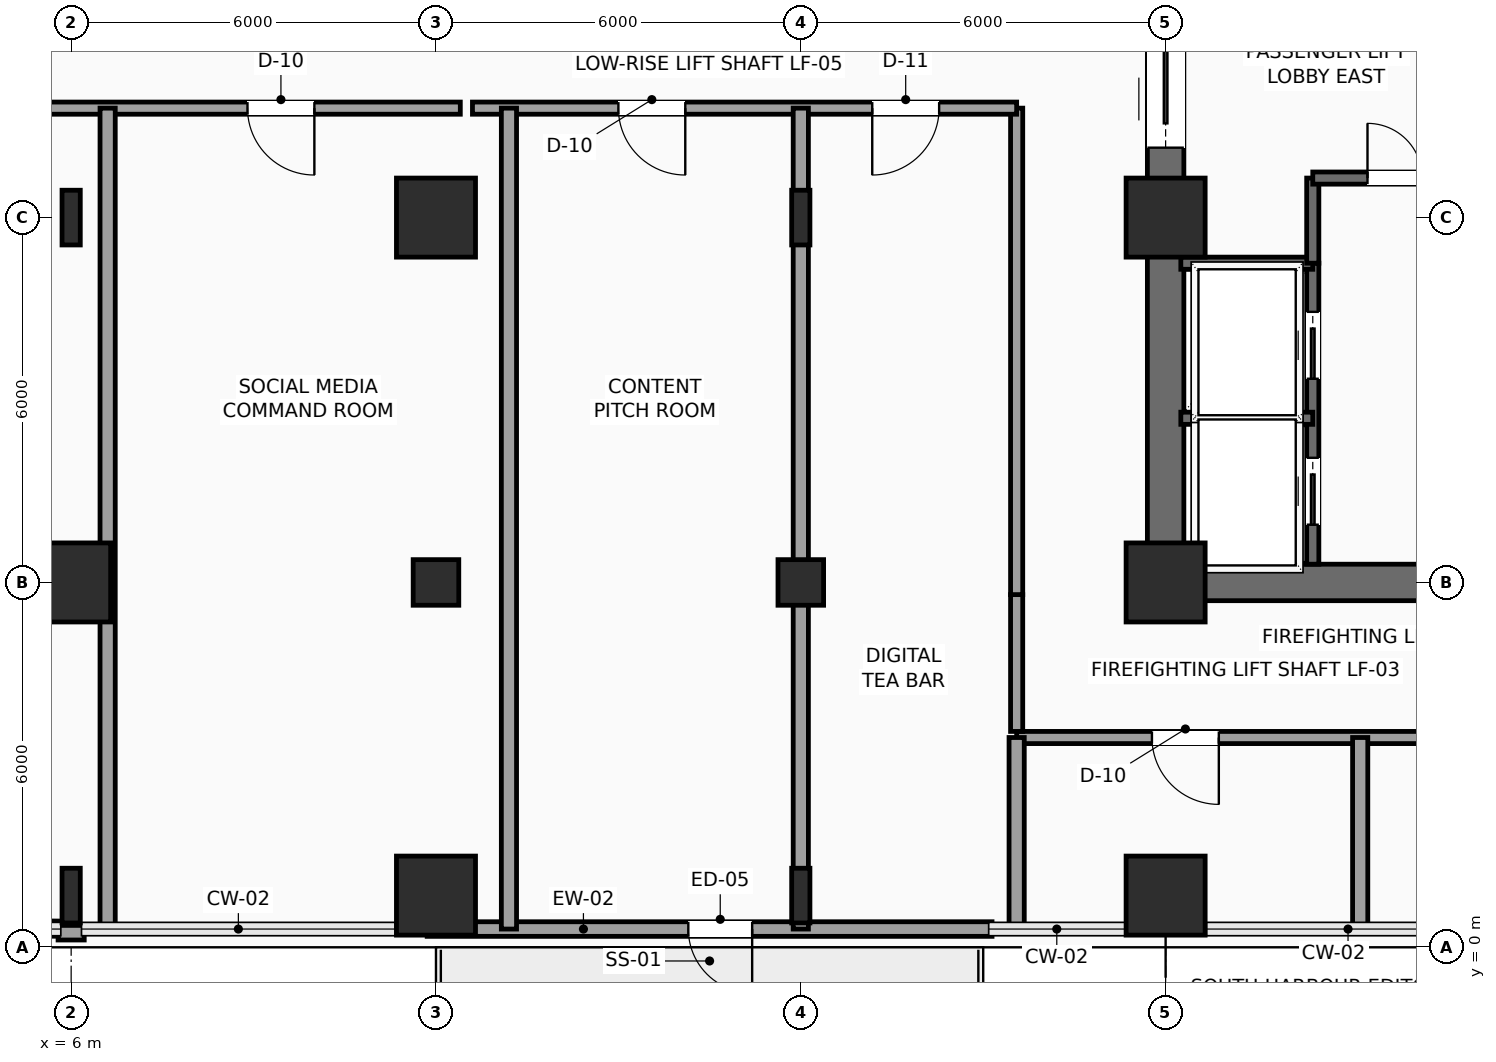
"""IFC4 building model, lengths in metres.
Left out: names, types, materials, properties, quantities, classifications, styles, units other than length and angle.
Written with IfcOpenShell. Run it as: python <this file> out.ifc"""

import sys

from ifc_helpers import new_model, si_unit, direction, frame, frame_2d, origin, origin_2d, place, context, subcontext, project, spatial, rectangle, hollow_rectangle, i_section, extrude, element, fill, save


model = new_model("IFC4")
c1 = context("Model", 3, precision=1e-05, world=origin(), true_north=direction((0.0, 1.0)))
c2 = subcontext(c1, "Body", "Model", "MODEL_VIEW")
j1 = project(units=[si_unit("LENGTHUNIT", "METRE"), si_unit("PLANEANGLEUNIT", "RADIAN")], contexts=[c1])
p1 = place(None, origin())
s1 = spatial("IfcSite", under=j1, at=p1, CompositionType="ELEMENT")
p2 = place(p1, origin())
s2 = spatial("IfcBuilding", under=s1, at=p2, CompositionType="ELEMENT")
p3 = place(p2, frame((0.0, 0.0, 83.1)))
s3 = spatial("IfcBuildingStorey", under=s2, at=p3, CompositionType="ELEMENT", Elevation=83.1)
for number, where, z_axis, x_axis in (
    (1, (24.0, 6.0, 0.0), (0.0, 0.0, 1.0), (1.0, 0.0, 0.0)),
    (2, (24.0, 12.0, 0.0), (0.0, 0.0, 1.0), (1.0, 0.0, 0.0)),
):
    element("IfcColumn", number, at=place(p3, frame(where, z_axis=z_axis, x_axis=x_axis)), inside=s3, PredefinedType="COLUMN", context=c2, shape_type="SweptSolid", body=[
        extrude(rectangle(XDim=1.3, YDim=1.3, at=origin_2d()), origin(), (0.0, 0.0, 1.0), 3.9),
    ])
p4 = place(p3, frame((6.0, 0.85, 0.0), z_axis=(0.0, 0.0, 1.0), x_axis=(1.0, 0.0, 0.0)))
e3 = element("IfcColumn", 3, at=p4, inside=s3, PredefinedType="COLUMN", context=c2, shape_type="SweptSolid", body=[
    extrude(i_section(OverallWidth=0.3, OverallDepth=0.9, WebThickness=0.019, FlangeThickness=0.035, FilletRadius=0.03, at=origin_2d()), origin(), (0.0, 0.0, 1.0), 3.9),
])
p5 = place(p3, frame((6.0, 6.0, 0.0), z_axis=(0.0, 0.0, 1.0), x_axis=(1.0, 0.0, 0.0)))
e4 = element("IfcColumn", 4, at=p5, inside=s3, PredefinedType="COLUMN", context=c2, shape_type="SweptSolid", body=[
    extrude(rectangle(XDim=1.3, YDim=1.3, at=origin_2d()), origin(), (0.0, 0.0, 1.0), 3.9),
])
p6 = place(p3, frame((6.0, 12.0, 0.0), z_axis=(0.0, 0.0, 1.0), x_axis=(1.0, 0.0, 0.0)))
e5 = element("IfcColumn", 5, at=p6, inside=s3, PredefinedType="COLUMN", context=c2, shape_type="SweptSolid", body=[
    extrude(i_section(OverallWidth=0.3, OverallDepth=0.9, WebThickness=0.019, FlangeThickness=0.035, FilletRadius=0.03, at=origin_2d()), origin(), (0.0, 0.0, 1.0), 3.9),
])
p7 = place(p3, frame((12.0, 0.85, 0.0), z_axis=(0.0, 0.0, 1.0), x_axis=(1.0, 0.0, 0.0)))
e6 = element("IfcColumn", 6, at=p7, inside=s3, PredefinedType="COLUMN", context=c2, shape_type="SweptSolid", body=[
    extrude(rectangle(XDim=1.3, YDim=1.3, at=origin_2d()), origin(), (0.0, 0.0, 1.0), 3.9),
])
p8 = place(p3, frame((12.0, 6.0, 0.0), z_axis=(0.0, 0.0, 1.0), x_axis=(1.0, 0.0, 0.0)))
e7 = element("IfcColumn", 7, at=p8, inside=s3, PredefinedType="COLUMN", context=c2, shape_type="SweptSolid", body=[
    extrude(hollow_rectangle(XDim=0.75, YDim=0.75, WallThickness=0.035, InnerFilletRadius=0.035, OuterFilletRadius=0.05, at=origin_2d()), origin(), (0.0, 0.0, 1.0), 3.9),
])
p9 = place(p3, frame((12.0, 12.0, 0.0), z_axis=(0.0, 0.0, 1.0), x_axis=(1.0, 0.0, 0.0)))
e8 = element("IfcColumn", 8, at=p9, inside=s3, PredefinedType="COLUMN", context=c2, shape_type="SweptSolid", body=[
    extrude(rectangle(XDim=1.3, YDim=1.3, at=origin_2d()), origin(), (0.0, 0.0, 1.0), 3.9),
])
p10 = place(p3, frame((18.0, 0.85, 0.0), z_axis=(0.0, 0.0, 1.0), x_axis=(1.0, 0.0, 0.0)))
e9 = element("IfcColumn", 9, at=p10, inside=s3, PredefinedType="COLUMN", context=c2, shape_type="SweptSolid", body=[
    extrude(i_section(OverallWidth=0.3, OverallDepth=0.9, WebThickness=0.019, FlangeThickness=0.035, FilletRadius=0.03, at=origin_2d()), origin(), (0.0, 0.0, 1.0), 3.9),
])
p11 = place(p3, frame((18.0, 6.0, 0.0), z_axis=(0.0, 0.0, 1.0), x_axis=(1.0, 0.0, 0.0)))
e10 = element("IfcColumn", 10, at=p11, inside=s3, PredefinedType="COLUMN", context=c2, shape_type="SweptSolid", body=[
    extrude(hollow_rectangle(XDim=0.75, YDim=0.75, WallThickness=0.035, InnerFilletRadius=0.035, OuterFilletRadius=0.05, at=origin_2d()), origin(), (0.0, 0.0, 1.0), 3.9),
])
p12 = place(p3, frame((18.0, 12.0, 0.0), z_axis=(0.0, 0.0, 1.0), x_axis=(1.0, 0.0, 0.0)))
e11 = element("IfcColumn", 11, at=p12, inside=s3, PredefinedType="COLUMN", context=c2, shape_type="SweptSolid", body=[
    extrude(i_section(OverallWidth=0.3, OverallDepth=0.9, WebThickness=0.019, FlangeThickness=0.035, FilletRadius=0.03, at=origin_2d()), origin(), (0.0, 0.0, 1.0), 3.9),
])
p13 = place(p3, frame((24.0, 0.85, 0.0), z_axis=(0.0, 0.0, 1.0), x_axis=(1.0, 0.0, 0.0)))
e12 = element("IfcColumn", 12, at=p13, inside=s3, PredefinedType="COLUMN", context=c2, shape_type="SweptSolid", body=[
    extrude(rectangle(XDim=1.3, YDim=1.3, at=origin_2d()), origin(), (0.0, 0.0, 1.0), 3.9),
])
p14 = place(p3, frame((21.145, 0.3, 0.0), z_axis=(0.0, 0.0, 1.0), x_axis=(-1.0, 0.0, 0.0)))
e13 = element("IfcWall", 13, at=p14, inside=s3, PredefinedType="SOLIDWALL", context=c2, shape_type="SweptSolid", body=[
    extrude(rectangle(XDim=9.29, YDim=0.24, at=frame_2d((4.645, 0.0))), origin(), (0.0, 0.0, 1.0), 3.65),
])
p15 = place(p14, frame((3.945, 0.0, 0.0)))
e14 = element("IfcOpeningElement", 14, at=p15, cuts=e13, PredefinedType="OPENING", context=c2, shape_type="SweptSolid", body=[
    extrude(rectangle(XDim=1.05, YDim=2.2, at=frame_2d((0.525, 1.1))), frame((0.0, 0.13, 0.0), z_axis=(0.0, -1.0, 0.0), x_axis=(1.0, 0.0, 0.0)), (0.0, 0.0, 1.0), 0.26),
])
p16 = place(p3, frame((6.215, 0.24, 0.0), z_axis=(0.0, 0.0, 1.0), x_axis=(-1.0, 0.0, 0.0)))
e15 = element("IfcWall", 15, at=p16, inside=s3, PredefinedType="SOLIDWALL", context=c2, shape_type="SweptSolid", body=[
    extrude(rectangle(XDim=0.43, YDim=0.24, at=frame_2d((0.215, 0.0))), origin(), (0.0, 0.0, 1.0), 3.65),
])
p17 = place(p3, frame((24.0, 6.0, 0.0), z_axis=(0.0, 0.0, 1.0), x_axis=(1.0, 0.0, 0.0)))
e16 = element("IfcWall", 16, at=p17, inside=s3, PredefinedType="SHEAR", context=c2, shape_type="SweptSolid", body=[
    extrude(rectangle(XDim=9.6, YDim=0.6, at=frame_2d((4.8, 0.0))), origin(), (0.0, 0.0, 1.0), 3.65),
])
p18 = place(p3, frame((24.0, 6.0, 0.0), z_axis=(0.0, 0.0, 1.0), x_axis=(0.0, 1.0, 0.0)))
e17 = element("IfcWall", 17, at=p18, inside=s3, PredefinedType="SHEAR", context=c2, shape_type="SweptSolid", body=[
    extrude(rectangle(XDim=12.0, YDim=0.6, at=frame_2d((6.0, 0.0))), origin(), (0.0, 0.0, 1.0), 3.65),
])
p19 = place(p18, frame((7.15, 0.0, 0.0)))
e18 = element("IfcOpeningElement", 18, at=p19, cuts=e17, PredefinedType="OPENING", context=c2, shape_type="SweptSolid", body=[
    extrude(rectangle(XDim=1.6, YDim=2.3, at=frame_2d((0.8, 1.15))), frame((0.0, 0.31, 0.0), z_axis=(0.0, -1.0, 0.0), x_axis=(1.0, 0.0, 0.0)), (0.0, 0.0, 1.0), 0.62),
])
p20 = place(p3, frame((26.42, 6.3, 0.0), z_axis=(0.0, 0.0, 1.0), x_axis=(0.0, 1.0, 0.0)))
e19 = element("IfcWall", 19, at=p20, inside=s3, PredefinedType="SHEAR", context=c2, shape_type="SweptSolid", body=[
    extrude(rectangle(XDim=4.95, YDim=0.2, at=frame_2d((2.475, 0.0))), origin(), (0.0, 0.0, 1.0), 3.65),
])
p21 = place(p20, frame((0.65, 0.0, 0.0)))
e20 = element("IfcOpeningElement", 20, at=p21, cuts=e19, PredefinedType="OPENING", context=c2, shape_type="SweptSolid", body=[
    extrude(rectangle(XDim=1.1, YDim=2.2, at=frame_2d((0.55, 1.1))), frame((0.0, 0.11, 0.0), z_axis=(0.0, -1.0, 0.0), x_axis=(1.0, 0.0, 0.0)), (0.0, 0.0, 1.0), 0.22),
])
p22 = place(p20, frame((3.05, 0.0, 0.0)))
e21 = element("IfcOpeningElement", 21, at=p22, cuts=e19, PredefinedType="OPENING", context=c2, shape_type="SweptSolid", body=[
    extrude(rectangle(XDim=1.1, YDim=2.2, at=frame_2d((0.55, 1.1))), frame((0.0, 0.11, 0.0), z_axis=(0.0, -1.0, 0.0), x_axis=(1.0, 0.0, 0.0)), (0.0, 0.0, 1.0), 0.22),
])
for number, where, z_axis, x_axis in (
    (22, (24.25, 8.7, 0.0), (0.0, 0.0, 1.0), (1.0, 0.0, 0.0)),
    (23, (24.25, 11.25, 0.0), (0.0, 0.0, 1.0), (1.0, 0.0, 0.0)),
):
    element("IfcWall", number, at=place(p3, frame(where, z_axis=z_axis, x_axis=x_axis)), inside=s3, PredefinedType="SHEAR", context=c2, shape_type="SweptSolid", body=[
        extrude(rectangle(XDim=2.17, YDim=0.2, at=frame_2d((1.085, 0.0))), origin(), (0.0, 0.0, 1.0), 3.65),
    ])
p23 = place(p3, frame((26.42, 11.25, 0.0), z_axis=(0.0, 0.0, 1.0), x_axis=(0.0, 1.0, 0.0)))
e24 = element("IfcWall", 24, at=p23, inside=s3, PredefinedType="SHEAR", context=c2, shape_type="SweptSolid", body=[
    extrude(rectangle(XDim=1.4, YDim=0.2, at=frame_2d((0.7, 0.0))), origin(), (0.0, 0.0, 1.0), 3.65),
])
p24 = place(p3, frame((26.42, 12.65, 0.0), z_axis=(0.0, 0.0, 1.0), x_axis=(1.0, 0.0, 0.0)))
e25 = element("IfcWall", 25, at=p24, inside=s3, PredefinedType="SHEAR", context=c2, shape_type="SweptSolid", body=[
    extrude(rectangle(XDim=2.84, YDim=0.2, at=frame_2d((1.42, 0.0))), origin(), (0.0, 0.0, 1.0), 3.65),
])
p25 = place(p24, frame((0.9, 0.0, 0.0)))
e26 = element("IfcOpeningElement", 26, at=p25, cuts=e25, PredefinedType="OPENING", context=c2, shape_type="SweptSolid", body=[
    extrude(rectangle(XDim=0.9, YDim=2.15, at=frame_2d((0.45, 1.075))), frame((0.0, 0.11, 0.0), z_axis=(0.0, -1.0, 0.0), x_axis=(1.0, 0.0, 0.0)), (0.0, 0.0, 1.0), 0.22),
])
p26 = place(p3, frame((36.15, 3.45, 0.0), z_axis=(0.0, 0.0, 1.0), x_axis=(-1.0, 0.0, 0.0)))
e27 = element("IfcWall", 27, at=p26, inside=s3, PredefinedType="PARTITIONING", context=c2, shape_type="SweptSolid", body=[
    extrude(rectangle(XDim=14.6, YDim=0.2, at=frame_2d((7.3, 0.0))), origin(), (0.0, 0.0, 1.0), 3.142),
])
p27 = place(p26, frame((11.275, 0.0, 0.0)))
e28 = element("IfcOpeningElement", 28, at=p27, cuts=e27, PredefinedType="OPENING", context=c2, shape_type="SweptSolid", body=[
    extrude(rectangle(XDim=1.1, YDim=2.25, at=frame_2d((0.55, 1.125))), frame((0.0, 0.11, 0.0), z_axis=(0.0, -1.0, 0.0), x_axis=(1.0, 0.0, 0.0)), (0.0, 0.0, 1.0), 0.22),
])
p28 = place(p26, frame((5.65, 0.0, 0.0)))
e29 = element("IfcOpeningElement", 29, at=p28, cuts=e27, PredefinedType="OPENING", context=c2, shape_type="SweptSolid", body=[
    extrude(rectangle(XDim=1.1, YDim=2.25, at=frame_2d((0.55, 1.125))), frame((0.0, 0.11, 0.0), z_axis=(0.0, -1.0, 0.0), x_axis=(1.0, 0.0, 0.0)), (0.0, 0.0, 1.0), 0.22),
])
p29 = place(p3, frame((21.55, 3.55, 0.0), z_axis=(0.0, 0.0, 1.0), x_axis=(0.0, 1.0, 0.0)))
e30 = element("IfcWall", 30, at=p29, inside=s3, PredefinedType="PARTITIONING", context=c2, shape_type="SweptSolid", body=[
    extrude(rectangle(XDim=2.25, YDim=0.2, at=frame_2d((1.125, 0.0))), origin(), (0.0, 0.0, 1.0), 3.65),
])
p30 = place(p3, frame((21.55, 5.8, 0.0), z_axis=(0.0, 0.0, 1.0), x_axis=(0.0, 1.0, 0.0)))
e31 = element("IfcWall", 31, at=p30, inside=s3, PredefinedType="PARTITIONING", context=c2, shape_type="SweptSolid", body=[
    extrude(rectangle(XDim=8.0, YDim=0.2, at=frame_2d((4.0, 0.0))), origin(), (0.0, 0.0, 1.0), 3.65),
])
p31 = place(p3, frame((21.55, 13.8, 0.0), z_axis=(0.0, 0.0, 1.0), x_axis=(-1.0, 0.0, 0.0)))
e32 = element("IfcWall", 32, at=p31, inside=s3, PredefinedType="PARTITIONING", context=c2, shape_type="SweptSolid", body=[
    extrude(rectangle(XDim=8.95, YDim=0.2, at=frame_2d((4.475, 0.0))), origin(), (0.0, 0.0, 1.0), 3.65),
])
p32 = place(p31, frame((5.45, 0.0, 0.0)))
e33 = element("IfcOpeningElement", 33, at=p32, cuts=e32, PredefinedType="OPENING", context=c2, shape_type="SweptSolid", body=[
    extrude(rectangle(XDim=1.1, YDim=2.25, at=frame_2d((0.55, 1.125))), frame((0.0, 0.11, 0.0), z_axis=(0.0, -1.0, 0.0), x_axis=(1.0, 0.0, 0.0)), (0.0, 0.0, 1.0), 0.22),
])
p33 = place(p31, frame((1.275, 0.0, 0.0)))
e34 = element("IfcOpeningElement", 34, at=p33, cuts=e32, PredefinedType="OPENING", context=c2, shape_type="SweptSolid", body=[
    extrude(rectangle(XDim=1.1, YDim=2.25, at=frame_2d((0.55, 1.125))), frame((0.0, 0.11, 0.0), z_axis=(0.0, -1.0, 0.0), x_axis=(1.0, 0.0, 0.0)), (0.0, 0.0, 1.0), 0.22),
])
p34 = place(p3, frame((12.4, 13.8, 0.0), z_axis=(0.0, 0.0, 1.0), x_axis=(-1.0, 0.0, 0.0)))
e35 = element("IfcWall", 35, at=p34, inside=s3, PredefinedType="PARTITIONING", context=c2, shape_type="SweptSolid", body=[
    extrude(rectangle(XDim=7.15, YDim=0.2, at=frame_2d((3.575, 0.0))), origin(), (0.0, 0.0, 1.0), 3.65),
])
p35 = place(p34, frame((2.4, 0.0, 0.0)))
e36 = element("IfcOpeningElement", 36, at=p35, cuts=e35, PredefinedType="OPENING", context=c2, shape_type="SweptSolid", body=[
    extrude(rectangle(XDim=1.1, YDim=2.25, at=frame_2d((0.55, 1.125))), frame((0.0, 0.11, 0.0), z_axis=(0.0, -1.0, 0.0), x_axis=(1.0, 0.0, 0.0)), (0.0, 0.0, 1.0), 0.22),
])
p36 = place(p3, frame((0.35, 0.35, 0.0), z_axis=(0.0, 0.0, 1.0), x_axis=(0.99996767298, -0.008040708569, 0.0)))
e37 = element("IfcWall", 37, at=p36, inside=s3, PredefinedType="PARTITIONING", context=c2, shape_type="SweptSolid", body=[
    extrude(rectangle(XDim=5.435, YDim=0.25, at=frame_2d((2.718, 0.0))), origin(), (0.0, 0.0, 1.0), 3.65),
])
for number, where, z_axis, x_axis in (
    (38, (6.6, 0.3, 0.0), (0.0, 0.0, 1.0), (0.0, 1.0, 0.0)),
    (39, (13.2, 0.3, 0.0), (0.0, 0.0, 1.0), (0.0, 1.0, 0.0)),
):
    element("IfcWall", number, at=place(p3, frame(where, z_axis=z_axis, x_axis=x_axis)), inside=s3, PredefinedType="PARTITIONING", context=c2, shape_type="SweptSolid", body=[
        extrude(rectangle(XDim=13.5, YDim=0.25, at=frame_2d((6.75, 0.0))), origin(), (0.0, 0.0, 1.0), 3.65),
    ])
p37 = place(p3, frame((18.0, 0.3, 0.0), z_axis=(0.0, 0.0, 1.0), x_axis=(0.0, 1.0, 0.0)))
e40 = element("IfcWall", 40, at=p37, inside=s3, PredefinedType="PARTITIONING", context=c2, shape_type="SweptSolid", body=[
    extrude(rectangle(XDim=13.5, YDim=0.25, at=frame_2d((6.75, 0.0))), origin(), (0.0, 0.0, 1.0), 2.992),
])
for number, where, z_axis, x_axis in (
    (41, (21.55, 0.3, 0.0), (0.0, 0.0, 1.0), (0.0, 1.0, 0.0)),
    (42, (27.2, 0.3, 0.0), (0.0, 0.0, 1.0), (0.0, 1.0, 0.0)),
):
    element("IfcWall", number, at=place(p3, frame(where, z_axis=z_axis, x_axis=x_axis)), inside=s3, PredefinedType="PARTITIONING", context=c2, shape_type="SweptSolid", body=[
        extrude(rectangle(XDim=3.15, YDim=0.25, at=frame_2d((1.575, 0.0))), origin(), (0.0, 0.0, 1.0), 3.65),
    ])
p38 = place(p15, origin())
e43 = element("IfcDoor", 43, at=p38, inside=s3, OperationType="SINGLE_SWING_LEFT", PredefinedType="DOOR", context=c2, shape_type="SweptSolid", body=[
    extrude(rectangle(XDim=1.05, YDim=2.2, at=frame_2d((0.525, 1.1))), frame((0.0, 0.025, 0.0), z_axis=(0.0, -1.0, 0.0), x_axis=(1.0, 0.0, 0.0)), (0.0, 0.0, 1.0), 0.05),
])
fill(e14, e43)
p39 = place(p19, origin())
e44 = element("IfcDoor", 44, at=p39, inside=s3, OperationType="DOUBLE_DOOR_SLIDING", PredefinedType="DOOR", context=c2, shape_type="SweptSolid", body=[
    extrude(rectangle(XDim=1.6, YDim=2.3, at=frame_2d((0.8, 1.15))), frame((0.0, 0.025, 0.0), z_axis=(0.0, -1.0, 0.0), x_axis=(1.0, 0.0, 0.0)), (0.0, 0.0, 1.0), 0.05),
])
fill(e18, e44)
p40 = place(p21, origin())
e45 = element("IfcDoor", 45, at=p40, inside=s3, OperationType="SLIDING_TO_LEFT", PredefinedType="DOOR", context=c2, shape_type="SweptSolid", body=[
    extrude(rectangle(XDim=1.1, YDim=2.2, at=frame_2d((0.55, 1.1))), frame((0.0, 0.025, 0.0), z_axis=(0.0, -1.0, 0.0), x_axis=(1.0, 0.0, 0.0)), (0.0, 0.0, 1.0), 0.05),
])
fill(e20, e45)
p41 = place(p22, origin())
e46 = element("IfcDoor", 46, at=p41, inside=s3, OperationType="SLIDING_TO_LEFT", PredefinedType="DOOR", context=c2, shape_type="SweptSolid", body=[
    extrude(rectangle(XDim=1.1, YDim=2.2, at=frame_2d((0.55, 1.1))), frame((0.0, 0.025, 0.0), z_axis=(0.0, -1.0, 0.0), x_axis=(1.0, 0.0, 0.0)), (0.0, 0.0, 1.0), 0.05),
])
fill(e21, e46)
p42 = place(p25, origin())
e47 = element("IfcDoor", 47, at=p42, inside=s3, OperationType="SINGLE_SWING_LEFT", PredefinedType="DOOR", context=c2, shape_type="SweptSolid", body=[
    extrude(rectangle(XDim=0.9, YDim=2.15, at=frame_2d((0.45, 1.075))), frame((0.0, 0.025, 0.0), z_axis=(0.0, -1.0, 0.0), x_axis=(1.0, 0.0, 0.0)), (0.0, 0.0, 1.0), 0.05),
])
fill(e26, e47)
p43 = place(p27, origin())
e48 = element("IfcDoor", 48, at=p43, inside=s3, OperationType="SINGLE_SWING_LEFT", PredefinedType="DOOR", context=c2, shape_type="SweptSolid", body=[
    extrude(rectangle(XDim=1.1, YDim=2.25, at=frame_2d((0.55, 1.125))), frame((0.0, 0.025, 0.0), z_axis=(0.0, -1.0, 0.0), x_axis=(1.0, 0.0, 0.0)), (0.0, 0.0, 1.0), 0.05),
])
fill(e28, e48)
p44 = place(p32, origin())
e49 = element("IfcDoor", 49, at=p44, inside=s3, OperationType="SINGLE_SWING_LEFT", PredefinedType="DOOR", context=c2, shape_type="SweptSolid", body=[
    extrude(rectangle(XDim=1.1, YDim=2.25, at=frame_2d((0.55, 1.125))), frame((0.0, 0.025, 0.0), z_axis=(0.0, -1.0, 0.0), x_axis=(1.0, 0.0, 0.0)), (0.0, 0.0, 1.0), 0.05),
])
fill(e33, e49)
p45 = place(p33, origin())
e50 = element("IfcDoor", 50, at=p45, inside=s3, OperationType="SINGLE_SWING_RIGHT", PredefinedType="DOOR", context=c2, shape_type="SweptSolid", body=[
    extrude(rectangle(XDim=1.1, YDim=2.25, at=frame_2d((0.55, 1.125))), frame((0.0, 0.025, 0.0), z_axis=(0.0, -1.0, 0.0), x_axis=(1.0, 0.0, 0.0)), (0.0, 0.0, 1.0), 0.05),
])
fill(e34, e50)
p46 = place(p35, origin())
e51 = element("IfcDoor", 51, at=p46, inside=s3, OperationType="SINGLE_SWING_LEFT", PredefinedType="DOOR", context=c2, shape_type="SweptSolid", body=[
    extrude(rectangle(XDim=1.1, YDim=2.25, at=frame_2d((0.55, 1.125))), frame((0.0, 0.025, 0.0), z_axis=(0.0, -1.0, 0.0), x_axis=(1.0, 0.0, 0.0)), (0.0, 0.0, 1.0), 0.05),
])
fill(e36, e51)
save(model, sys.argv[1])
